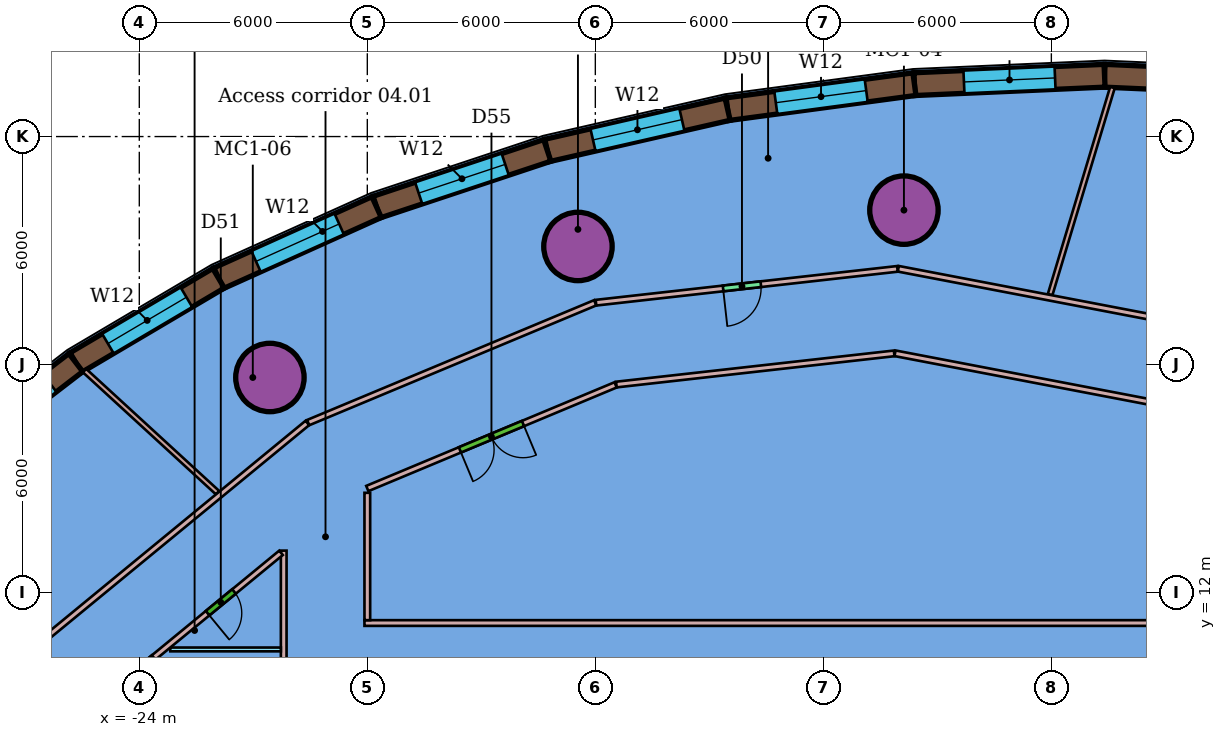
"""IFC4 building model, lengths in metres.
Left out: names, types, materials, properties, quantities, classifications, styles, units other than length and angle.
Written with IfcOpenShell. Run it as: python <this file> out.ifc"""

import sys

from ifc_helpers import new_model, si_unit, direction, frame, frame_2d, origin, origin_2d, place, context, subcontext, project, spatial, rectangle, hollow_circle, extrude, element, fill, save


model = new_model("IFC4")
c1 = context("Model", 3, precision=1e-05, world=origin(), true_north=direction((0.0, 1.0)))
c2 = subcontext(c1, "Body", "Model", "MODEL_VIEW")
j1 = project(units=[si_unit("LENGTHUNIT", "METRE"), si_unit("PLANEANGLEUNIT", "RADIAN")], contexts=[c1])
p1 = place(None, origin())
s1 = spatial("IfcSite", under=j1, at=p1, CompositionType="ELEMENT")
p2 = place(p1, origin())
s2 = spatial("IfcBuilding", under=s1, at=p2, CompositionType="ELEMENT")
p3 = place(p2, frame((0.0, 0.0, 31.5)))
s3 = spatial("IfcBuildingStorey", under=s2, at=p3, CompositionType="ELEMENT", Elevation=31.5)
for number, where, z_axis, x_axis in (
    (1, (-3.879, 22.064, 0.0), (0.0, 0.0, 1.0), (1.0, 0.0, 0.0)),
    (2, (-12.458, 21.108, 0.0), (0.0, 0.0, 1.0), (1.0, 0.0, 0.0)),
    (3, (-20.563, 17.66, 0.0), (0.0, 0.0, 1.0), (1.0, 0.0, 0.0)),
):
    element("IfcColumn", number, at=place(p3, frame(where, z_axis=z_axis, x_axis=x_axis)), inside=s3, PredefinedType="COLUMN", context=c2, shape_type="SweptSolid", body=[
        extrude(hollow_circle(Radius=0.9, WallThickness=0.06, at=origin_2d()), origin(), (0.0, 0.0, 1.0), 4.35),
    ])
p4 = place(p3, frame((-18.075, 11.2, 0.0), z_axis=(0.0, 0.0, 1.0), x_axis=(1.0, 0.0, 0.0)))
e4 = element("IfcWall", 4, at=p4, inside=s3, PredefinedType="PARTITIONING", context=c2, shape_type="SweptSolid", body=[
    extrude(rectangle(XDim=26.35, YDim=0.15, at=frame_2d((13.175, 0.0))), origin(), (0.0, 0.0, 1.0), 3.9),
])
p5 = place(p3, frame((-20.2, -11.125, 0.0), z_axis=(0.0, 0.0, 1.0), x_axis=(0.0, 1.0, 0.0)))
e5 = element("IfcWall", 5, at=p5, inside=s3, PredefinedType="PARTITIONING", context=c2, shape_type="SweptSolid", body=[
    extrude(rectangle(XDim=24.23, YDim=0.15, at=frame_2d((12.115, 0.0))), origin(), (0.0, 0.0, 1.0), 3.9),
])
p6 = place(p3, frame((-18.0, 11.275, 0.0), z_axis=(0.0, 0.0, 1.0), x_axis=(0.0, 1.0, 0.0)))
e6 = element("IfcWall", 6, at=p6, inside=s3, PredefinedType="PARTITIONING", context=c2, shape_type="SweptSolid", body=[
    extrude(rectangle(XDim=3.351, YDim=0.15, at=frame_2d((1.676, 0.0))), origin(), (0.0, 0.0, 1.0), 3.9),
])
p7 = place(p3, frame((-11.467, 17.466, 0.0), z_axis=(0.0, 0.0, 1.0), x_axis=(-0.9228124679, -0.38524946345, 0.0)))
e7 = element("IfcWall", 7, at=p7, inside=s3, PredefinedType="PARTITIONING", context=c2, shape_type="SweptSolid", body=[
    extrude(rectangle(XDim=7.08, YDim=0.15, at=frame_2d((3.54, 0.0))), origin(), (0.0, 0.0, 1.0), 3.9),
])
p8 = place(p7, frame((2.64, 0.0, 0.0)))
e8 = element("IfcOpeningElement", 8, at=p8, cuts=e7, PredefinedType="OPENING", context=c2, shape_type="SweptSolid", body=[
    extrude(rectangle(XDim=1.8, YDim=2.4, at=frame_2d((0.9, 1.2))), frame((0.0, 0.085, 0.0), z_axis=(0.0, -1.0, 0.0), x_axis=(1.0, 0.0, 0.0)), (0.0, 0.0, 1.0), 0.17),
])
p9 = place(p3, frame((-11.447, 17.475, 0.0), z_axis=(0.0, 0.0, 1.0), x_axis=(0.993762113274, 0.111520680692, 0.0)))
e9 = element("IfcWall", 9, at=p9, inside=s3, PredefinedType="PARTITIONING", context=c2, shape_type="SweptSolid", body=[
    extrude(rectangle(XDim=7.356, YDim=0.15, at=frame_2d((3.678, 0.0))), origin(), (0.0, 0.0, 1.0), 3.9),
])
p10 = place(p3, frame((-4.114, 18.298, 0.0), z_axis=(0.0, 0.0, 1.0), x_axis=(0.982205706766, -0.187808278828, 0.0)))
e10 = element("IfcWall", 10, at=p10, inside=s3, PredefinedType="PARTITIONING", context=c2, shape_type="SweptSolid", body=[
    extrude(rectangle(XDim=7.573, YDim=0.15, at=frame_2d((3.787, 0.0))), origin(), (0.0, 0.0, 1.0), 3.9),
])
p11 = place(p3, frame((-23.185, 10.505, 0.0), z_axis=(0.0, 0.0, 1.0), x_axis=(1.0, 0.0, 0.0)))
e11 = element("IfcWall", 11, at=p11, inside=s3, PredefinedType="PARTITIONING", context=c2, shape_type="SweptSolid", body=[
    extrude(rectangle(XDim=2.91, YDim=0.1, at=frame_2d((1.455, 0.0))), origin(), (0.0, 0.0, 1.0), 3.9),
])
p12 = place(p3, frame((-20.271, 13.047, 0.0), z_axis=(0.0, 0.0, 1.0), x_axis=(-0.772561089928, -0.634940439986, 0.0)))
e12 = element("IfcWall", 12, at=p12, inside=s3, PredefinedType="PARTITIONING", context=c2, shape_type="SweptSolid", body=[
    extrude(rectangle(XDim=5.672, YDim=0.15, at=frame_2d((2.836, 0.0))), origin(), (0.0, 0.0, 1.0), 3.9),
])
p13 = place(p12, frame((1.602, 0.0, 0.0)))
e13 = element("IfcOpeningElement", 13, at=p13, cuts=e12, PredefinedType="OPENING", context=c2, shape_type="SweptSolid", body=[
    extrude(rectangle(XDim=0.9, YDim=2.1, at=frame_2d((0.45, 1.05))), frame((0.0, 0.085, 0.0), z_axis=(0.0, -1.0, 0.0), x_axis=(1.0, 0.0, 0.0)), (0.0, 0.0, 1.0), 0.17),
])
p14 = place(p12, frame((4.338, 0.0, 0.0)))
e14 = element("IfcOpeningElement", 14, at=p14, cuts=e12, PredefinedType="OPENING", context=c2, shape_type="SweptSolid", body=[
    extrude(rectangle(XDim=0.9, YDim=2.1, at=frame_2d((0.45, 1.05))), frame((0.0, 0.085, 0.0), z_axis=(0.0, -1.0, 0.0), x_axis=(1.0, 0.0, 0.0)), (0.0, 0.0, 1.0), 0.17),
])
p15 = place(p3, frame((-0.033, 19.84, 0.0), z_axis=(0.0, 0.0, 1.0), x_axis=(0.288063986859, 0.957611162986, 0.0)))
e15 = element("IfcWall", 15, at=p15, inside=s3, PredefinedType="PARTITIONING", context=c2, shape_type="SweptSolid", body=[
    extrude(rectangle(XDim=5.692, YDim=0.125, at=frame_2d((2.846, 0.0))), origin(), (0.0, 0.0, 1.0), 3.9),
])
p16 = place(p3, frame((-4.028, 20.521, 0.0), z_axis=(0.0, 0.0, 1.0), x_axis=(0.982207009241, -0.187801466976, 0.0)))
e16 = element("IfcWall", 16, at=p16, inside=s3, PredefinedType="PARTITIONING", context=c2, shape_type="SweptSolid", body=[
    extrude(rectangle(XDim=8.234, YDim=0.15, at=frame_2d((4.117, 0.0))), origin(), (0.0, 0.0, 1.0), 3.9),
])
p17 = place(p3, frame((-25.44, 17.841, 0.0), z_axis=(0.0, 0.0, 1.0), x_axis=(0.736761384667, -0.676152839278, 0.0)))
e17 = element("IfcWall", 17, at=p17, inside=s3, PredefinedType="PARTITIONING", context=c2, shape_type="SweptSolid", body=[
    extrude(rectangle(XDim=4.749, YDim=0.125, at=frame_2d((2.375, 0.0))), origin(), (0.0, 0.0, 1.0), 3.9),
])
p18 = place(p3, frame((-4.051, 20.518, 0.0), z_axis=(0.0, 0.0, 1.0), x_axis=(-0.993764533241, -0.11149911422, 0.0)))
e18 = element("IfcWall", 18, at=p18, inside=s3, PredefinedType="PARTITIONING", context=c2, shape_type="SweptSolid", body=[
    extrude(rectangle(XDim=7.981, YDim=0.15, at=frame_2d((3.991, 0.0))), origin(), (0.0, 0.0, 1.0), 3.9),
])
p19 = place(p18, frame((3.616, 0.0, 0.0)))
e19 = element("IfcOpeningElement", 19, at=p19, cuts=e18, PredefinedType="OPENING", context=c2, shape_type="SweptSolid", body=[
    extrude(rectangle(XDim=1.0, YDim=2.1, at=frame_2d((0.5, 1.05))), frame((0.0, 0.085, 0.0), z_axis=(0.0, -1.0, 0.0), x_axis=(1.0, 0.0, 0.0)), (0.0, 0.0, 1.0), 0.17),
])
p20 = place(p3, frame((-19.556, 16.473, 0.0), z_axis=(0.0, 0.0, 1.0), x_axis=(0.922818121352, 0.385235921097, 0.0)))
e20 = element("IfcWall", 20, at=p20, inside=s3, PredefinedType="PARTITIONING", context=c2, shape_type="SweptSolid", body=[
    extrude(rectangle(XDim=8.184, YDim=0.15, at=frame_2d((4.092, 0.0))), origin(), (0.0, 0.0, 1.0), 3.9),
])
p21 = place(p3, frame((-26.387, 10.868, 0.0), z_axis=(0.0, 0.0, 1.0), x_axis=(0.772575830308, 0.634922504266, 0.0)))
e21 = element("IfcWall", 21, at=p21, inside=s3, PredefinedType="PARTITIONING", context=c2, shape_type="SweptSolid", body=[
    extrude(rectangle(XDim=8.815, YDim=0.15, at=frame_2d((4.407, 0.0))), origin(), (0.0, 0.0, 1.0), 3.9),
])
p22 = place(p3, frame((6.403, 25.379, 0.0), z_axis=(0.0, 0.0, 1.0), x_axis=(-0.99902630841, 0.044118421369, 0.0)))
e22 = element("IfcWall", 22, at=p22, inside=s3, PredefinedType="SOLIDWALL", context=c2, shape_type="SweptSolid", body=[
    extrude(rectangle(XDim=5.008, YDim=0.6, at=frame_2d((2.504, 0.0))), origin(), (0.0, 0.0, 1.0), 4.35),
])
p23 = place(p22, frame((1.304, 0.0, 0.9)))
e23 = element("IfcOpeningElement", 23, at=p23, cuts=e22, PredefinedType="OPENING", context=c2, shape_type="SweptSolid", body=[
    extrude(rectangle(XDim=2.4, YDim=2.4, at=frame_2d((1.2, 1.2))), frame((0.0, 0.31, 0.0), z_axis=(0.0, -1.0, 0.0), x_axis=(1.0, 0.0, 0.0)), (0.0, 0.0, 1.0), 0.62),
])
p24 = place(p3, frame((1.4, 25.6, 0.0), z_axis=(0.0, 0.0, 1.0), x_axis=(-0.999026213515, -0.044120570136, 0.0)))
e24 = element("IfcWall", 24, at=p24, inside=s3, PredefinedType="SOLIDWALL", context=c2, shape_type="SweptSolid", body=[
    extrude(rectangle(XDim=5.008, YDim=0.6, at=frame_2d((2.504, 0.0))), origin(), (0.0, 0.0, 1.0), 4.35),
])
p25 = place(p24, frame((1.304, 0.0, 0.9)))
e25 = element("IfcOpeningElement", 25, at=p25, cuts=e24, PredefinedType="OPENING", context=c2, shape_type="SweptSolid", body=[
    extrude(rectangle(XDim=2.4, YDim=2.4, at=frame_2d((1.2, 1.2))), frame((0.0, 0.31, 0.0), z_axis=(0.0, -1.0, 0.0), x_axis=(1.0, 0.0, 0.0)), (0.0, 0.0, 1.0), 0.62),
])
p26 = place(p3, frame((-3.603, 25.379, 0.0), z_axis=(0.0, 0.0, 1.0), x_axis=(-0.991143444913, -0.132795600853, 0.0)))
e26 = element("IfcWall", 26, at=p26, inside=s3, PredefinedType="SOLIDWALL", context=c2, shape_type="SweptSolid", body=[
    extrude(rectangle(XDim=4.96, YDim=0.6, at=frame_2d((2.48, 0.0))), origin(), (0.0, 0.0, 1.0), 4.35),
])
p27 = place(p26, frame((1.28, 0.0, 0.9)))
e27 = element("IfcOpeningElement", 27, at=p27, cuts=e26, PredefinedType="OPENING", context=c2, shape_type="SweptSolid", body=[
    extrude(rectangle(XDim=2.4, YDim=2.4, at=frame_2d((1.2, 1.2))), frame((0.0, 0.31, 0.0), z_axis=(0.0, -1.0, 0.0), x_axis=(1.0, 0.0, 0.0)), (0.0, 0.0, 1.0), 0.62),
])
p28 = place(p3, frame((-8.519, 24.72, 0.0), z_axis=(0.0, 0.0, 1.0), x_axis=(-0.97483982486, -0.222906518224, 0.0)))
e28 = element("IfcWall", 28, at=p28, inside=s3, PredefinedType="SOLIDWALL", context=c2, shape_type="SweptSolid", body=[
    extrude(rectangle(XDim=4.867, YDim=0.6, at=frame_2d((2.434, 0.0))), origin(), (0.0, 0.0, 1.0), 4.35),
])
p29 = place(p28, frame((1.234, 0.0, 0.9)))
e29 = element("IfcOpeningElement", 29, at=p29, cuts=e28, PredefinedType="OPENING", context=c2, shape_type="SweptSolid", body=[
    extrude(rectangle(XDim=2.4, YDim=2.4, at=frame_2d((1.2, 1.2))), frame((0.0, 0.31, 0.0), z_axis=(0.0, -1.0, 0.0), x_axis=(1.0, 0.0, 0.0)), (0.0, 0.0, 1.0), 0.62),
])
p30 = place(p3, frame((-13.264, 23.635, 0.0), z_axis=(0.0, 0.0, 1.0), x_axis=(-0.94901810672, -0.315221561949, 0.0)))
e30 = element("IfcWall", 30, at=p30, inside=s3, PredefinedType="SOLIDWALL", context=c2, shape_type="SweptSolid", body=[
    extrude(rectangle(XDim=4.732, YDim=0.6, at=frame_2d((2.366, 0.0))), origin(), (0.0, 0.0, 1.0), 4.35),
])
p31 = place(p30, frame((1.166, 0.0, 0.9)))
e31 = element("IfcOpeningElement", 31, at=p31, cuts=e30, PredefinedType="OPENING", context=c2, shape_type="SweptSolid", body=[
    extrude(rectangle(XDim=2.4, YDim=2.4, at=frame_2d((1.2, 1.2))), frame((0.0, 0.31, 0.0), z_axis=(0.0, -1.0, 0.0), x_axis=(1.0, 0.0, 0.0)), (0.0, 0.0, 1.0), 0.62),
])
p32 = place(p3, frame((-17.755, 22.144, 0.0), z_axis=(0.0, 0.0, 1.0), x_axis=(-0.911894462824, -0.410424766152, 0.0)))
e32 = element("IfcWall", 32, at=p32, inside=s3, PredefinedType="SOLIDWALL", context=c2, shape_type="SweptSolid", body=[
    extrude(rectangle(XDim=4.561, YDim=0.6, at=frame_2d((2.281, 0.0))), origin(), (0.0, 0.0, 1.0), 4.35),
])
p33 = place(p32, frame((1.081, 0.0, 0.9)))
e33 = element("IfcOpeningElement", 33, at=p33, cuts=e32, PredefinedType="OPENING", context=c2, shape_type="SweptSolid", body=[
    extrude(rectangle(XDim=2.4, YDim=2.4, at=frame_2d((1.2, 1.2))), frame((0.0, 0.31, 0.0), z_axis=(0.0, -1.0, 0.0), x_axis=(1.0, 0.0, 0.0)), (0.0, 0.0, 1.0), 0.62),
])
p34 = place(p3, frame((-21.915, 20.272, 0.0), z_axis=(0.0, 0.0, 1.0), x_axis=(-0.861017868942, -0.508574703818, 0.0)))
e34 = element("IfcWall", 34, at=p34, inside=s3, PredefinedType="SOLIDWALL", context=c2, shape_type="SweptSolid", body=[
    extrude(rectangle(XDim=4.363, YDim=0.6, at=frame_2d((2.181, 0.0))), origin(), (0.0, 0.0, 1.0), 4.35),
])
p35 = place(p34, frame((0.981, 0.0, 0.9)))
e35 = element("IfcOpeningElement", 35, at=p35, cuts=e34, PredefinedType="OPENING", context=c2, shape_type="SweptSolid", body=[
    extrude(rectangle(XDim=2.4, YDim=2.4, at=frame_2d((1.2, 1.2))), frame((0.0, 0.31, 0.0), z_axis=(0.0, -1.0, 0.0), x_axis=(1.0, 0.0, 0.0)), (0.0, 0.0, 1.0), 0.62),
])
p36 = place(p3, frame((-25.671, 18.053, 0.0), z_axis=(0.0, 0.0, 1.0), x_axis=(-0.793065901338, -0.609135843745, 0.0)))
e36 = element("IfcWall", 36, at=p36, inside=s3, PredefinedType="SOLIDWALL", context=c2, shape_type="SweptSolid", body=[
    extrude(rectangle(XDim=4.147, YDim=0.6, at=frame_2d((2.073, 0.0))), origin(), (0.0, 0.0, 1.0), 4.35),
])
p37 = place(p36, frame((0.873, 0.0, 0.9)))
e37 = element("IfcOpeningElement", 37, at=p37, cuts=e36, PredefinedType="OPENING", context=c2, shape_type="SweptSolid", body=[
    extrude(rectangle(XDim=2.4, YDim=2.4, at=frame_2d((1.2, 1.2))), frame((0.0, 0.31, 0.0), z_axis=(0.0, -1.0, 0.0), x_axis=(1.0, 0.0, 0.0)), (0.0, 0.0, 1.0), 0.62),
])
p38 = place(p8, origin())
e38 = element("IfcDoor", 38, at=p38, inside=s3, OperationType="DOUBLE_DOOR_SINGLE_SWING", PredefinedType="DOOR", context=c2, shape_type="SweptSolid", body=[
    extrude(rectangle(XDim=1.8, YDim=2.4, at=frame_2d((0.9, 1.2))), frame((0.0, 0.025, 0.0), z_axis=(0.0, -1.0, 0.0), x_axis=(1.0, 0.0, 0.0)), (0.0, 0.0, 1.0), 0.05),
])
fill(e8, e38)
p39 = place(p13, origin())
e39 = element("IfcDoor", 39, at=p39, inside=s3, OperationType="SINGLE_SWING_RIGHT", PredefinedType="DOOR", context=c2, shape_type="SweptSolid", body=[
    extrude(rectangle(XDim=0.9, YDim=2.1, at=frame_2d((0.45, 1.05))), frame((0.0, 0.025, 0.0), z_axis=(0.0, -1.0, 0.0), x_axis=(1.0, 0.0, 0.0)), (0.0, 0.0, 1.0), 0.05),
])
fill(e13, e39)
p40 = place(p14, origin())
e40 = element("IfcDoor", 40, at=p40, inside=s3, OperationType="SINGLE_SWING_LEFT", PredefinedType="DOOR", context=c2, shape_type="SweptSolid", body=[
    extrude(rectangle(XDim=0.9, YDim=2.1, at=frame_2d((0.45, 1.05))), frame((0.0, 0.025, 0.0), z_axis=(0.0, -1.0, 0.0), x_axis=(1.0, 0.0, 0.0)), (0.0, 0.0, 1.0), 0.05),
])
fill(e14, e40)
p41 = place(p19, origin())
e41 = element("IfcDoor", 41, at=p41, inside=s3, OperationType="SINGLE_SWING_RIGHT", PredefinedType="DOOR", context=c2, shape_type="SweptSolid", body=[
    extrude(rectangle(XDim=1.0, YDim=2.1, at=frame_2d((0.5, 1.05))), frame((0.0, 0.025, 0.0), z_axis=(0.0, -1.0, 0.0), x_axis=(1.0, 0.0, 0.0)), (0.0, 0.0, 1.0), 0.05),
])
fill(e19, e41)
p42 = place(p25, origin())
e42 = element("IfcWindow", 42, at=p42, inside=s3, PartitioningType="SINGLE_PANEL", PredefinedType="WINDOW", context=c2, shape_type="SweptSolid", body=[
    extrude(rectangle(XDim=2.4, YDim=2.4, at=frame_2d((1.2, 1.2))), frame((0.0, 0.03, 0.0), z_axis=(0.0, -1.0, 0.0), x_axis=(1.0, 0.0, 0.0)), (0.0, 0.0, 1.0), 0.06),
])
fill(e25, e42)
p43 = place(p27, origin())
e43 = element("IfcWindow", 43, at=p43, inside=s3, PartitioningType="SINGLE_PANEL", PredefinedType="WINDOW", context=c2, shape_type="SweptSolid", body=[
    extrude(rectangle(XDim=2.4, YDim=2.4, at=frame_2d((1.2, 1.2))), frame((0.0, 0.03, 0.0), z_axis=(0.0, -1.0, 0.0), x_axis=(1.0, 0.0, 0.0)), (0.0, 0.0, 1.0), 0.06),
])
fill(e27, e43)
p44 = place(p29, origin())
e44 = element("IfcWindow", 44, at=p44, inside=s3, PartitioningType="SINGLE_PANEL", PredefinedType="WINDOW", context=c2, shape_type="SweptSolid", body=[
    extrude(rectangle(XDim=2.4, YDim=2.4, at=frame_2d((1.2, 1.2))), frame((0.0, 0.03, 0.0), z_axis=(0.0, -1.0, 0.0), x_axis=(1.0, 0.0, 0.0)), (0.0, 0.0, 1.0), 0.06),
])
fill(e29, e44)
p45 = place(p31, origin())
e45 = element("IfcWindow", 45, at=p45, inside=s3, PartitioningType="SINGLE_PANEL", PredefinedType="WINDOW", context=c2, shape_type="SweptSolid", body=[
    extrude(rectangle(XDim=2.4, YDim=2.4, at=frame_2d((1.2, 1.2))), frame((0.0, 0.03, 0.0), z_axis=(0.0, -1.0, 0.0), x_axis=(1.0, 0.0, 0.0)), (0.0, 0.0, 1.0), 0.06),
])
fill(e31, e45)
p46 = place(p33, origin())
e46 = element("IfcWindow", 46, at=p46, inside=s3, PartitioningType="SINGLE_PANEL", PredefinedType="WINDOW", context=c2, shape_type="SweptSolid", body=[
    extrude(rectangle(XDim=2.4, YDim=2.4, at=frame_2d((1.2, 1.2))), frame((0.0, 0.03, 0.0), z_axis=(0.0, -1.0, 0.0), x_axis=(1.0, 0.0, 0.0)), (0.0, 0.0, 1.0), 0.06),
])
fill(e33, e46)
p47 = place(p35, origin())
e47 = element("IfcWindow", 47, at=p47, inside=s3, PartitioningType="SINGLE_PANEL", PredefinedType="WINDOW", context=c2, shape_type="SweptSolid", body=[
    extrude(rectangle(XDim=2.4, YDim=2.4, at=frame_2d((1.2, 1.2))), frame((0.0, 0.03, 0.0), z_axis=(0.0, -1.0, 0.0), x_axis=(1.0, 0.0, 0.0)), (0.0, 0.0, 1.0), 0.06),
])
fill(e35, e47)
save(model, sys.argv[1])
